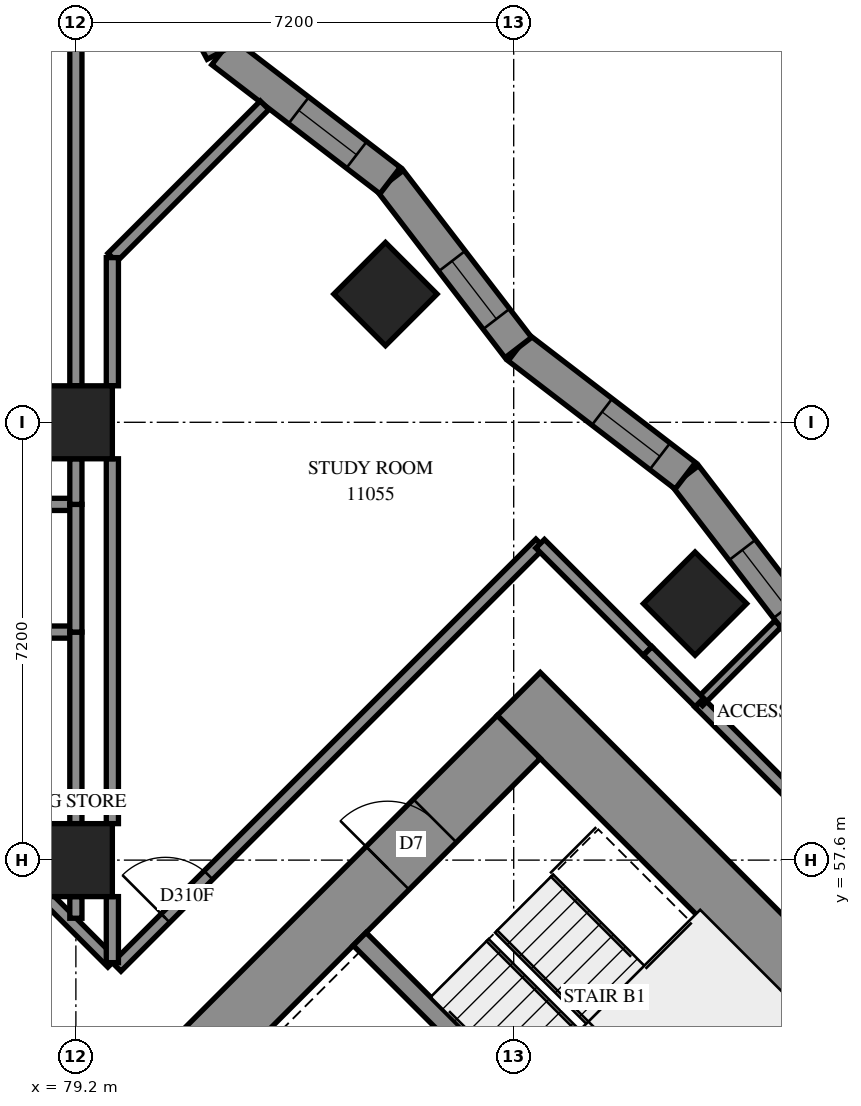
"""IFC4 building model, lengths in metres.
Left out: names, types, materials, properties, quantities, classifications, styles, units other than length and angle.
Written with IfcOpenShell. Run it as: python <this file> out.ifc"""

import sys

from ifc_helpers import new_model, si_unit, direction, frame, frame_2d, origin, origin_2d, place, context, subcontext, project, spatial, polyline, rectangle, outline, extrude, element, fill, save


model = new_model("IFC4")
c1 = context("Model", 3, precision=1e-05, world=origin(), true_north=direction((0.0, 1.0)))
c2 = subcontext(c1, "Body", "Model", "MODEL_VIEW")
j1 = project(units=[si_unit("LENGTHUNIT", "METRE"), si_unit("PLANEANGLEUNIT", "RADIAN")], contexts=[c1])
p1 = place(None, origin())
s1 = spatial("IfcSite", under=j1, at=p1, CompositionType="ELEMENT")
p2 = place(p1, origin())
s2 = spatial("IfcBuilding", under=s1, at=p2, CompositionType="ELEMENT")
p3 = place(p2, frame((0.0, 0.0, 44.0)))
s3 = spatial("IfcBuildingStorey", under=s2, at=p3, CompositionType="ELEMENT", Elevation=44.0)
for number, where, z_axis, x_axis in (
    (1, (79.2, 57.6, 0.0), (0.0, 0.0, 1.0), (1.0, 0.0, 0.0)),
    (2, (79.2, 64.8, 0.0), (0.0, 0.0, 1.0), (1.0, 0.0, 0.0)),
    (3, (84.291, 66.909, 0.0), (0.0, 0.0, 1.0), (0.707, -0.707, 0.0)),
    (4, (89.382, 61.818, 0.0), (0.0, 0.0, 1.0), (0.707, -0.707, 0.0)),
):
    element("IfcColumn", number, at=place(p3, frame(where, z_axis=z_axis, x_axis=x_axis)), inside=s3, PredefinedType="COLUMN", context=c2, shape_type="SweptSolid", body=[
        extrude(rectangle(XDim=1.2, YDim=1.2, at=origin_2d()), origin(), (0.0, 0.0, 1.0), 3.1),
    ])
p4 = place(p3, frame((86.483, 60.333, -0.3), z_axis=(0.0, 0.0, 1.0), x_axis=(0.70710983, -0.7071037324, 0.0)))
e5 = element("IfcWall", 5, at=p4, inside=s3, PredefinedType="SHEAR", context=c2, shape_type="SweptSolid", body=[
    extrude(rectangle(XDim=16.4, YDim=1.0, at=frame_2d((8.2, 0.0))), origin(), (0.0, 0.0, 1.0), 2.7),
])
p5 = place(p4, frame((11.0, 0.0, 0.3)))
e6 = element("IfcOpeningElement", 6, at=p5, cuts=e5, PredefinedType="OPENING", context=c2, shape_type="SweptSolid", body=[
    extrude(rectangle(XDim=0.8, YDim=2.1, at=frame_2d((0.4, 1.05))), frame((0.0, 0.51, 0.0), z_axis=(0.0, -1.0, 0.0), x_axis=(1.0, 0.0, 0.0)), (0.0, 0.0, 1.0), 1.02),
])
p6 = place(p3, frame((76.301, 49.443, -0.3), z_axis=(0.0, 0.0, 1.0), x_axis=(0.7071067812, 0.7071067812, 0.0)))
e7 = element("IfcWall", 7, at=p6, inside=s3, PredefinedType="SHEAR", context=c2, shape_type="SweptSolid", body=[
    extrude(rectangle(XDim=14.4, YDim=1.0, at=frame_2d((7.2, 0.0))), origin(), (0.0, 0.0, 1.0), 2.7),
])
p7 = place(p6, frame((4.55, 0.0, 0.3)))
e8 = element("IfcOpeningElement", 8, at=p7, cuts=e7, PredefinedType="OPENING", context=c2, shape_type="SweptSolid", body=[
    extrude(rectangle(XDim=1.1, YDim=2.1, at=frame_2d((0.55, 1.05))), frame((0.0, 0.51, 0.0), z_axis=(0.0, -1.0, 0.0), x_axis=(1.0, 0.0, 0.0)), (0.0, 0.0, 1.0), 1.02),
])
p8 = place(p6, frame((11.35, 0.0, 0.3)))
e9 = element("IfcOpeningElement", 9, at=p8, cuts=e7, PredefinedType="OPENING", context=c2, shape_type="SweptSolid", body=[
    extrude(rectangle(XDim=1.1, YDim=2.1, at=frame_2d((0.55, 1.05))), frame((0.0, 0.51, 0.0), z_axis=(0.0, -1.0, 0.0), x_axis=(1.0, 0.0, 0.0)), (0.0, 0.0, 1.0), 1.02),
])
p9 = place(p3, frame((83.867, 56.302, 0.0), z_axis=(0.0, 0.0, 1.0), x_axis=(0.7071137256, -0.7070998367, 0.0)))
e10 = element("IfcWall", 10, at=p9, inside=s3, PredefinedType="SOLIDWALL", context=c2, shape_type="SweptSolid", body=[
    extrude(rectangle(XDim=7.2, YDim=0.3, at=frame_2d((3.6, 0.0))), origin(), (0.0, 0.0, 1.0), 3.1),
])
p10 = place(p3, frame((91.332, 61.173, 0.0), z_axis=(0.0, 0.0, 1.0), x_axis=(-0.6089903711, 0.7931776144, 0.0)))
e11 = element("IfcWall", 11, at=p10, inside=s3, PredefinedType="SOLIDWALL", context=c2, shape_type="SweptSolid", body=[
    extrude(outline(polyline([(0.036, -0.275), (3.499, -0.275), (3.427, 0.275), (-0.036, 0.275), (0.036, -0.275)])), origin(), (0.0, 0.0, 1.0), 3.1),
])
p11 = place(p10, frame((0.725, 0.0, 0.5)))
e12 = element("IfcOpeningElement", 12, at=p11, cuts=e11, PredefinedType="OPENING", context=c2, shape_type="SweptSolid", body=[
    extrude(rectangle(XDim=1.2, YDim=2.45, at=frame_2d((0.6, 1.225))), frame((0.0, 0.285, 0.0), z_axis=(0.0, -1.0, 0.0), x_axis=(1.0, 0.0, 0.0)), (0.0, 0.0, 1.0), 0.57),
])
p12 = place(p3, frame((89.223, 63.92, 0.0), z_axis=(0.0, 0.0, 1.0), x_axis=(-0.7931915638, 0.6089722022, 0.0)))
e13 = element("IfcWall", 13, at=p12, inside=s3, PredefinedType="SOLIDWALL", context=c2, shape_type="SweptSolid", body=[
    extrude(outline(polyline([(-0.036, -0.275), (3.427, -0.275), (3.499, 0.275), (0.036, 0.275), (-0.036, -0.275)])), origin(), (0.0, 0.0, 1.0), 3.1),
])
p13 = place(p12, frame((0.527, 0.0, 0.5)))
e14 = element("IfcOpeningElement", 14, at=p13, cuts=e13, PredefinedType="OPENING", context=c2, shape_type="SweptSolid", body=[
    extrude(rectangle(XDim=1.2, YDim=2.45, at=frame_2d((0.6, 1.225))), frame((0.0, 0.285, 0.0), z_axis=(0.0, -1.0, 0.0), x_axis=(1.0, 0.0, 0.0)), (0.0, 0.0, 1.0), 0.57),
])
p14 = place(p3, frame((86.476, 66.029, 0.0), z_axis=(0.0, 0.0, 1.0), x_axis=(-0.6089903711, 0.7931776144, 0.0)))
e15 = element("IfcWall", 15, at=p14, inside=s3, PredefinedType="SOLIDWALL", context=c2, shape_type="SweptSolid", body=[
    extrude(outline(polyline([(0.036, -0.275), (3.499, -0.275), (3.427, 0.275), (-0.036, 0.275), (0.036, -0.275)])), origin(), (0.0, 0.0, 1.0), 3.1),
])
p15 = place(p14, frame((0.593, 0.0, 0.5)))
e16 = element("IfcOpeningElement", 16, at=p15, cuts=e15, PredefinedType="OPENING", context=c2, shape_type="SweptSolid", body=[
    extrude(rectangle(XDim=1.2, YDim=2.45, at=frame_2d((0.6, 1.225))), frame((0.0, 0.285, 0.0), z_axis=(0.0, -1.0, 0.0), x_axis=(1.0, 0.0, 0.0)), (0.0, 0.0, 1.0), 0.57),
])
p16 = place(p3, frame((84.367, 68.775, 0.0), z_axis=(0.0, 0.0, 1.0), x_axis=(-0.7931717386, 0.6089980239, 0.0)))
e17 = element("IfcWall", 17, at=p16, inside=s3, PredefinedType="SOLIDWALL", context=c2, shape_type="SweptSolid", body=[
    extrude(outline(polyline([(-0.036, -0.275), (3.427, -0.275), (3.546, 0.275), (0.036, 0.275), (-0.036, -0.275)])), origin(), (0.0, 0.0, 1.0), 3.1),
])
p17 = place(p16, frame((0.695, 0.0, 0.5)))
e18 = element("IfcOpeningElement", 18, at=p17, cuts=e17, PredefinedType="OPENING", context=c2, shape_type="SweptSolid", body=[
    extrude(rectangle(XDim=1.2, YDim=2.45, at=frame_2d((0.6, 1.225))), frame((0.0, 0.285, 0.0), z_axis=(0.0, -1.0, 0.0), x_axis=(1.0, 0.0, 0.0)), (0.0, 0.0, 1.0), 0.57),
])
p18 = place(p3, frame((81.602, 70.898, 0.0), z_axis=(0.0, 0.0, 1.0), x_axis=(-0.4691559366, 0.8831153419, 0.0)))
e19 = element("IfcWall", 19, at=p18, inside=s3, PredefinedType="SOLIDWALL", context=c2, shape_type="SweptSolid", body=[
    extrude(outline(polyline([(0.06, -0.275), (3.65, -0.275), (3.209, 0.275), (-0.06, 0.275), (0.06, -0.275)])), origin(), (0.0, 0.0, 1.0), 3.1),
])
p19 = place(p18, frame((0.795, 0.0, 0.5)))
e20 = element("IfcOpeningElement", 20, at=p19, cuts=e19, PredefinedType="OPENING", context=c2, shape_type="SweptSolid", body=[
    extrude(rectangle(XDim=1.2, YDim=2.45, at=frame_2d((0.6, 1.225))), frame((0.0, 0.285, 0.0), z_axis=(0.0, -1.0, 0.0), x_axis=(1.0, 0.0, 0.0)), (0.0, 0.0, 1.0), 0.57),
])
p20 = place(p3, frame((79.871, 55.843, 0.0), z_axis=(0.0, 0.0, 1.0), x_axis=(0.7071067812, 0.7071067812, 0.0)))
e21 = element("IfcWall", 21, at=p20, inside=s3, PredefinedType="PARTITIONING", context=c2, shape_type="SweptSolid", body=[
    extrude(rectangle(XDim=9.85, YDim=0.2, at=frame_2d((4.925, 0.0))), origin(), (0.0, 0.0, 1.0), 3.1),
])
p21 = place(p20, frame((1.135, 0.0, 0.0)))
e22 = element("IfcOpeningElement", 22, at=p21, cuts=e21, PredefinedType="OPENING", context=c2, shape_type="SweptSolid", body=[
    extrude(rectangle(XDim=1.0, YDim=2.1, at=frame_2d((0.5, 1.05))), frame((0.0, 0.11, 0.0), z_axis=(0.0, -1.0, 0.0), x_axis=(1.0, 0.0, 0.0)), (0.0, 0.0, 1.0), 0.22),
])
p22 = place(p3, frame((89.451, 60.189, 0.0), z_axis=(0.0, 0.0, 1.0), x_axis=(0.7071796965, -0.7070338583, 0.0)))
e23 = element("IfcWall", 23, at=p22, inside=s3, PredefinedType="PARTITIONING", context=c2, shape_type="SweptSolid", body=[
    extrude(rectangle(XDim=9.6, YDim=0.2, at=frame_2d((4.8, 0.0))), origin(), (0.0, 0.0, 1.0), 3.1),
])
p23 = place(p22, frame((7.315, 0.0, 0.0)))
e24 = element("IfcOpeningElement", 24, at=p23, cuts=e23, PredefinedType="OPENING", context=c2, shape_type="SweptSolid", body=[
    extrude(rectangle(XDim=0.9, YDim=2.1, at=frame_2d((0.45, 1.05))), frame((0.0, 0.11, 0.0), z_axis=(0.0, -1.0, 0.0), x_axis=(1.0, 0.0, 0.0)), (0.0, 0.0, 1.0), 0.22),
])
for number, where, z_axis, x_axis in (
    (25, (79.2, 65.4, 0.0), (0.0, 0.0, 1.0), (0.0, 1.0, 0.0)),
    (26, (79.8, 58.2, 0.0), (0.0, 0.0, 1.0), (0.0, 1.0, 0.0)),
):
    element("IfcWall", number, at=place(p3, frame(where, z_axis=z_axis, x_axis=x_axis)), inside=s3, PredefinedType="PARTITIONING", context=c2, shape_type="SweptSolid", body=[
        extrude(rectangle(XDim=6.0, YDim=0.2, at=frame_2d((3.0, 0.0))), origin(), (0.0, 0.0, 1.0), 3.1),
    ])
p24 = place(p3, frame((74.51, 63.45, 0.0), z_axis=(0.0, 0.0, 1.0), x_axis=(1.0, 0.0, 0.0)))
e27 = element("IfcWall", 27, at=p24, inside=s3, PredefinedType="PARTITIONING", context=c2, shape_type="SweptSolid", body=[
    extrude(rectangle(XDim=4.69, YDim=0.2, at=frame_2d((2.345, 0.0))), origin(), (0.0, 0.0, 1.0), 3.1),
])
p25 = place(p24, frame((3.12, 0.0, 0.0)))
e28 = element("IfcOpeningElement", 28, at=p25, cuts=e27, PredefinedType="OPENING", context=c2, shape_type="SweptSolid", body=[
    extrude(rectangle(XDim=0.9, YDim=2.1, at=frame_2d((0.45, 1.05))), frame((0.0, 0.11, 0.0), z_axis=(0.0, -1.0, 0.0), x_axis=(1.0, 0.0, 0.0)), (0.0, 0.0, 1.0), 0.22),
])
p26 = place(p3, frame((74.882, 61.35, 0.0), z_axis=(0.0, 0.0, 1.0), x_axis=(1.0, 0.0, 0.0)))
e29 = element("IfcWall", 29, at=p26, inside=s3, PredefinedType="PARTITIONING", context=c2, shape_type="SweptSolid", body=[
    extrude(rectangle(XDim=4.318, YDim=0.2, at=frame_2d((2.159, 0.0))), origin(), (0.0, 0.0, 1.0), 3.1),
])
p27 = place(p26, frame((0.78, 0.0, 0.0)))
e30 = element("IfcOpeningElement", 30, at=p27, cuts=e29, PredefinedType="OPENING", context=c2, shape_type="SweptSolid", body=[
    extrude(rectangle(XDim=1.0, YDim=2.1, at=frame_2d((0.5, 1.05))), frame((0.0, 0.11, 0.0), z_axis=(0.0, -1.0, 0.0), x_axis=(1.0, 0.0, 0.0)), (0.0, 0.0, 1.0), 0.22),
])
p28 = place(p3, frame((79.799, 67.509, 0.0), z_axis=(0.0, 0.0, 1.0), x_axis=(0.7070926629, 0.7071208992, 0.0)))
e31 = element("IfcWall", 31, at=p28, inside=s3, PredefinedType="PARTITIONING", context=c2, shape_type="SweptSolid", body=[
    extrude(rectangle(XDim=3.542, YDim=0.2, at=frame_2d((1.771, 0.0))), origin(), (0.0, 0.0, 1.0), 3.1),
])
p29 = place(p3, frame((79.2, 58.2, 0.0), z_axis=(0.0, 0.0, 1.0), x_axis=(0.0, 1.0, 0.0)))
e32 = element("IfcWall", 32, at=p29, inside=s3, PredefinedType="PARTITIONING", context=c2, shape_type="SweptSolid", body=[
    extrude(rectangle(XDim=3.15, YDim=0.2, at=frame_2d((1.575, 0.0))), origin(), (0.0, 0.0, 1.0), 3.1),
])
p30 = place(p3, frame((86.835, 62.803, 0.0), z_axis=(0.0, 0.0, 1.0), x_axis=(0.7071067812, -0.7071067812, 0.0)))
e33 = element("IfcWall", 33, at=p30, inside=s3, PredefinedType="PARTITIONING", context=c2, shape_type="SweptSolid", body=[
    extrude(rectangle(XDim=2.498, YDim=0.2, at=frame_2d((1.249, 0.0))), origin(), (0.0, 0.0, 1.0), 3.1),
])
p31 = place(p3, frame((79.8, 65.4, 0.0), z_axis=(0.0, 0.0, 1.0), x_axis=(0.0, 1.0, 0.0)))
e34 = element("IfcWall", 34, at=p31, inside=s3, PredefinedType="PARTITIONING", context=c2, shape_type="SweptSolid", body=[
    extrude(rectangle(XDim=2.108, YDim=0.2, at=frame_2d((1.054, 0.0))), origin(), (0.0, 0.0, 1.0), 3.1),
])
p32 = place(p3, frame((79.2, 61.35, 0.0), z_axis=(0.0, 0.0, 1.0), x_axis=(0.0, 1.0, 0.0)))
e35 = element("IfcWall", 35, at=p32, inside=s3, PredefinedType="PARTITIONING", context=c2, shape_type="SweptSolid", body=[
    extrude(rectangle(XDim=2.1, YDim=0.2, at=frame_2d((1.05, 0.0))), origin(), (0.0, 0.0, 1.0), 3.1),
])
p33 = place(p3, frame((89.453, 60.193, 0.0), z_axis=(0.0, 0.0, 1.0), x_axis=(0.7071067812, 0.7071067812, 0.0)))
e36 = element("IfcWall", 36, at=p33, inside=s3, PredefinedType="PARTITIONING", context=c2, shape_type="SweptSolid", body=[
    extrude(rectangle(XDim=1.828, YDim=0.15, at=frame_2d((0.914, 0.0))), origin(), (0.0, 0.0, 1.0), 3.1),
])
p34 = place(p3, frame((78.711, 56.997, 0.0), z_axis=(0.0, 0.0, 1.0), x_axis=(0.7071067812, -0.7071067812, 0.0)))
e37 = element("IfcWall", 37, at=p34, inside=s3, PredefinedType="PARTITIONING", context=c2, shape_type="SweptSolid", body=[
    extrude(rectangle(XDim=1.536, YDim=0.2, at=frame_2d((0.768, 0.0))), origin(), (0.0, 0.0, 1.0), 3.1),
])
p35 = place(p3, frame((88.603, 61.039, 0.0), z_axis=(0.0, 0.0, 1.0), x_axis=(0.7079391603, -0.7062734211, 0.0)))
e38 = element("IfcWall", 38, at=p35, inside=s3, PredefinedType="PARTITIONING", context=c2, shape_type="SweptSolid", body=[
    extrude(rectangle(XDim=1.201, YDim=0.2, at=frame_2d((0.6, 0.0))), origin(), (0.0, 0.0, 1.0), 3.1),
])
p36 = place(p3, frame((79.8, 55.914, 0.0), z_axis=(0.0, 0.0, 1.0), x_axis=(0.0, 1.0, 0.0)))
e39 = element("IfcWall", 39, at=p36, inside=s3, PredefinedType="PARTITIONING", context=c2, shape_type="SweptSolid", body=[
    extrude(rectangle(XDim=1.086, YDim=0.2, at=frame_2d((0.543, 0.0))), origin(), (0.0, 0.0, 1.0), 3.1),
])
p37 = place(p3, frame((79.2, 63.45, 0.0), z_axis=(0.0, 0.0, 1.0), x_axis=(0.0, 1.0, 0.0)))
e40 = element("IfcWall", 40, at=p37, inside=s3, PredefinedType="PARTITIONING", context=c2, shape_type="SweptSolid", body=[
    extrude(rectangle(XDim=0.75, YDim=0.2, at=frame_2d((0.375, 0.0))), origin(), (0.0, 0.0, 1.0), 3.1),
])
p38 = place(p3, frame((79.2, 56.644, 0.0), z_axis=(0.0, 0.0, 1.0), x_axis=(0.0, 1.0, 0.0)))
e41 = element("IfcWall", 41, at=p38, inside=s3, PredefinedType="PARTITIONING", context=c2, shape_type="SweptSolid", body=[
    extrude(rectangle(XDim=0.356, YDim=0.2, at=frame_2d((0.178, 0.0))), origin(), (0.0, 0.0, 1.0), 3.1),
])
p39 = place(p11, origin())
e42 = element("IfcWindow", 42, at=p39, inside=s3, PartitioningType="SINGLE_PANEL", PredefinedType="WINDOW", context=c2, shape_type="SweptSolid", body=[
    extrude(rectangle(XDim=1.2, YDim=2.45, at=frame_2d((0.6, 1.225))), frame((0.0, 0.155, 0.0), z_axis=(0.0, -1.0, 0.0), x_axis=(1.0, 0.0, 0.0)), (0.0, 0.0, 1.0), 0.06),
])
fill(e12, e42)
p40 = place(p13, origin())
e43 = element("IfcWindow", 43, at=p40, inside=s3, PartitioningType="SINGLE_PANEL", PredefinedType="WINDOW", context=c2, shape_type="SweptSolid", body=[
    extrude(rectangle(XDim=1.2, YDim=2.45, at=frame_2d((0.6, 1.225))), frame((0.0, 0.155, 0.0), z_axis=(0.0, -1.0, 0.0), x_axis=(1.0, 0.0, 0.0)), (0.0, 0.0, 1.0), 0.06),
])
fill(e14, e43)
p41 = place(p15, origin())
e44 = element("IfcWindow", 44, at=p41, inside=s3, PartitioningType="SINGLE_PANEL", PredefinedType="WINDOW", context=c2, shape_type="SweptSolid", body=[
    extrude(rectangle(XDim=1.2, YDim=2.45, at=frame_2d((0.6, 1.225))), frame((0.0, 0.155, 0.0), z_axis=(0.0, -1.0, 0.0), x_axis=(1.0, 0.0, 0.0)), (0.0, 0.0, 1.0), 0.06),
])
fill(e16, e44)
p42 = place(p17, origin())
e45 = element("IfcWindow", 45, at=p42, inside=s3, PartitioningType="SINGLE_PANEL", PredefinedType="WINDOW", context=c2, shape_type="SweptSolid", body=[
    extrude(rectangle(XDim=1.2, YDim=2.45, at=frame_2d((0.6, 1.225))), frame((0.0, 0.155, 0.0), z_axis=(0.0, -1.0, 0.0), x_axis=(1.0, 0.0, 0.0)), (0.0, 0.0, 1.0), 0.06),
])
fill(e18, e45)
p43 = place(p8, origin())
e46 = element("IfcDoor", 46, at=p43, inside=s3, OperationType="SINGLE_SWING_LEFT", PredefinedType="DOOR", context=c2, shape_type="SweptSolid", body=[
    extrude(rectangle(XDim=1.1, YDim=2.1, at=frame_2d((0.55, 1.05))), frame((0.0, 0.025, 0.0), z_axis=(0.0, -1.0, 0.0), x_axis=(1.0, 0.0, 0.0)), (0.0, 0.0, 1.0), 0.05),
])
fill(e9, e46)
p44 = place(p21, origin())
e47 = element("IfcDoor", 47, at=p44, inside=s3, OperationType="SINGLE_SWING_RIGHT", PredefinedType="DOOR", context=c2, shape_type="SweptSolid", body=[
    extrude(rectangle(XDim=1.0, YDim=2.1, at=frame_2d((0.5, 1.05))), frame((0.0, 0.025, 0.0), z_axis=(0.0, -1.0, 0.0), x_axis=(1.0, 0.0, 0.0)), (0.0, 0.0, 1.0), 0.05),
])
fill(e22, e47)
save(model, sys.argv[1])
